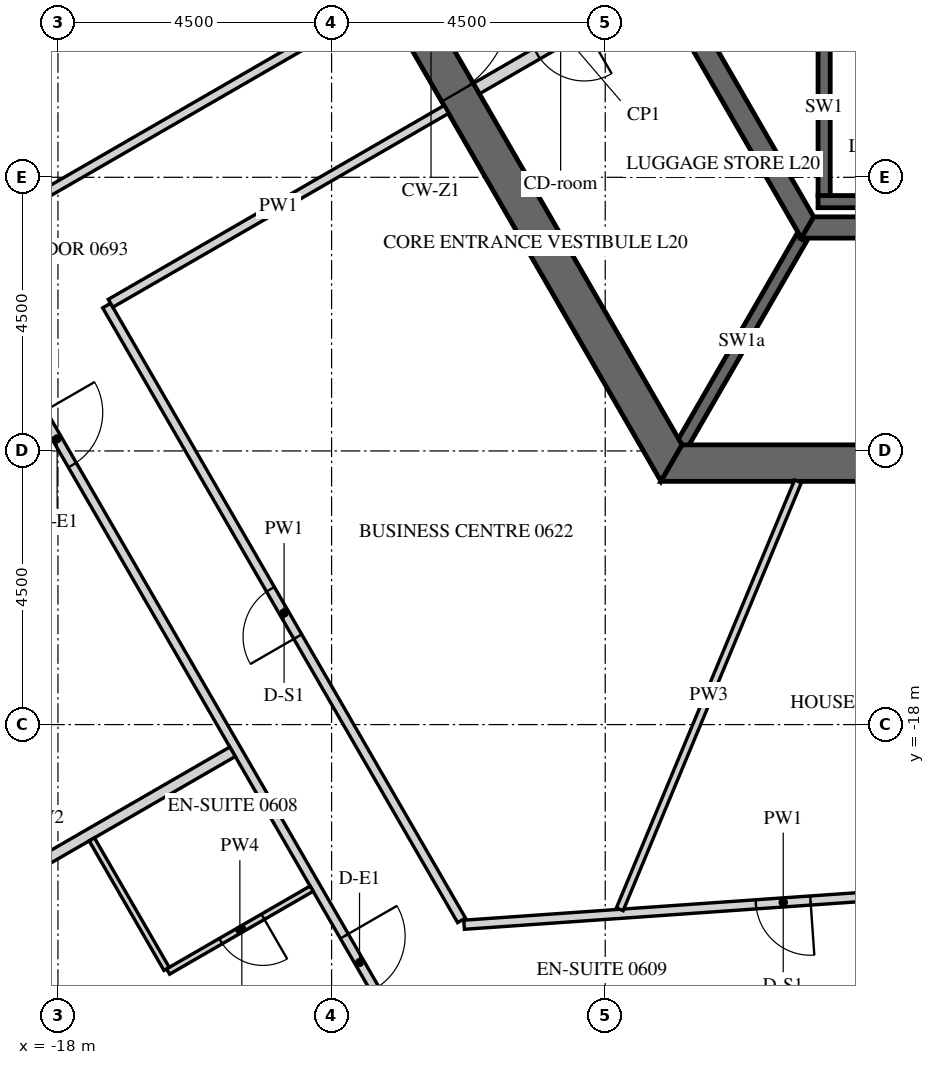
"""IFC4 building model, lengths in metres.
Left out: names, types, materials, properties, quantities, classifications, styles, units other than length and angle.
Written with IfcOpenShell. Run it as: python <this file> out.ifc"""

import sys

from ifc_helpers import new_model, si_unit, direction, frame, frame_2d, origin, place, context, subcontext, project, spatial, polyline, rectangle, outline, extrude, element, fill, save


model = new_model("IFC4")
c1 = context("Model", 3, precision=1e-05, world=origin(), true_north=direction((0.0, 1.0)))
c2 = subcontext(c1, "Body", "Model", "MODEL_VIEW")
j1 = project(units=[si_unit("LENGTHUNIT", "METRE"), si_unit("PLANEANGLEUNIT", "RADIAN")], contexts=[c1])
p1 = place(None, origin())
s1 = spatial("IfcSite", under=j1, at=p1, CompositionType="ELEMENT")
p2 = place(p1, origin())
s2 = spatial("IfcBuilding", under=s1, at=p2, CompositionType="ELEMENT")
p3 = place(p2, frame((0.0, 0.0, 92.1)))
s3 = spatial("IfcBuildingStorey", under=s2, at=p3, CompositionType="ELEMENT", Elevation=92.1)
p4 = place(p3, frame((-32.655, -2.89, -0.15), z_axis=(0.0, 0.0, 1.0), x_axis=(0.499997711317, -0.866026725152, 0.0)))
e1 = element("IfcWall", 1, at=p4, inside=s3, PredefinedType="SOLIDWALL", context=c2, shape_type="SweptSolid", body=[
    extrude(outline(polyline([(-0.022, -0.275), (30.097, -0.275), (30.045, 0.275), (0.022, 0.275), (-0.022, -0.275)])), origin(), (0.0, 0.0, 1.0), 3.9),
])
p5 = place(p4, frame((1.236, 0.0, 1.05)))
e2 = element("IfcOpeningElement", 2, at=p5, cuts=e1, PredefinedType="OPENING", context=c2, shape_type="SweptSolid", body=[
    extrude(rectangle(XDim=2.4, YDim=2.4, at=frame_2d((1.2, 1.2))), frame((0.0, 0.285, 0.0), z_axis=(0.0, -1.0, 0.0), x_axis=(1.0, 0.0, 0.0)), (0.0, 0.0, 1.0), 0.57),
])
p6 = place(p4, frame((4.835, 0.0, 1.05)))
e3 = element("IfcOpeningElement", 3, at=p6, cuts=e1, PredefinedType="OPENING", context=c2, shape_type="SweptSolid", body=[
    extrude(rectangle(XDim=2.4, YDim=2.4, at=frame_2d((1.2, 1.2))), frame((0.0, 0.285, 0.0), z_axis=(0.0, -1.0, 0.0), x_axis=(1.0, 0.0, 0.0)), (0.0, 0.0, 1.0), 0.57),
])
p7 = place(p4, frame((8.436, 0.0, 1.05)))
e4 = element("IfcOpeningElement", 4, at=p7, cuts=e1, PredefinedType="OPENING", context=c2, shape_type="SweptSolid", body=[
    extrude(rectangle(XDim=2.4, YDim=2.4, at=frame_2d((1.2, 1.2))), frame((0.0, 0.285, 0.0), z_axis=(0.0, -1.0, 0.0), x_axis=(1.0, 0.0, 0.0)), (0.0, 0.0, 1.0), 0.57),
])
p8 = place(p4, frame((12.035, 0.0, 1.05)))
e5 = element("IfcOpeningElement", 5, at=p8, cuts=e1, PredefinedType="OPENING", context=c2, shape_type="SweptSolid", body=[
    extrude(rectangle(XDim=2.4, YDim=2.4, at=frame_2d((1.2, 1.2))), frame((0.0, 0.285, 0.0), z_axis=(0.0, -1.0, 0.0), x_axis=(1.0, 0.0, 0.0)), (0.0, 0.0, 1.0), 0.57),
])
p9 = place(p4, frame((15.635, 0.0, 1.05)))
e6 = element("IfcOpeningElement", 6, at=p9, cuts=e1, PredefinedType="OPENING", context=c2, shape_type="SweptSolid", body=[
    extrude(rectangle(XDim=2.4, YDim=2.4, at=frame_2d((1.2, 1.2))), frame((0.0, 0.285, 0.0), z_axis=(0.0, -1.0, 0.0), x_axis=(1.0, 0.0, 0.0)), (0.0, 0.0, 1.0), 0.57),
])
p10 = place(p4, frame((19.236, 0.0, 1.05)))
e7 = element("IfcOpeningElement", 7, at=p10, cuts=e1, PredefinedType="OPENING", context=c2, shape_type="SweptSolid", body=[
    extrude(rectangle(XDim=2.4, YDim=2.4, at=frame_2d((1.2, 1.2))), frame((0.0, 0.285, 0.0), z_axis=(0.0, -1.0, 0.0), x_axis=(1.0, 0.0, 0.0)), (0.0, 0.0, 1.0), 0.57),
])
p11 = place(p4, frame((22.835, 0.0, 1.05)))
e8 = element("IfcOpeningElement", 8, at=p11, cuts=e1, PredefinedType="OPENING", context=c2, shape_type="SweptSolid", body=[
    extrude(rectangle(XDim=2.4, YDim=2.4, at=frame_2d((1.2, 1.2))), frame((0.0, 0.285, 0.0), z_axis=(0.0, -1.0, 0.0), x_axis=(1.0, 0.0, 0.0)), (0.0, 0.0, 1.0), 0.57),
])
p12 = place(p4, frame((26.436, 0.0, 1.05)))
e9 = element("IfcOpeningElement", 9, at=p12, cuts=e1, PredefinedType="OPENING", context=c2, shape_type="SweptSolid", body=[
    extrude(rectangle(XDim=2.4, YDim=2.4, at=frame_2d((1.2, 1.2))), frame((0.0, 0.285, 0.0), z_axis=(0.0, -1.0, 0.0), x_axis=(1.0, 0.0, 0.0)), (0.0, 0.0, 1.0), 0.57),
])
p13 = place(p3, frame((-15.819, 0.0, -0.15), z_axis=(0.0, 0.0, 1.0), x_axis=(0.499999880136, -0.866025472988, 0.0)))
e10 = element("IfcWall", 10, at=p13, inside=s3, PredefinedType="SHEAR", context=c2, shape_type="SweptSolid", body=[
    extrude(outline(polyline([(-0.173, -0.3), (15.993, -0.3), (15.646, 0.3), (0.173, 0.3), (-0.173, -0.3)])), origin(), (0.0, 0.0, 1.0), 3.9),
])
p14 = place(p13, frame((6.981, 0.0, 0.15)))
e11 = element("IfcOpeningElement", 11, at=p14, cuts=e10, PredefinedType="OPENING", context=c2, shape_type="SweptSolid", body=[
    extrude(rectangle(XDim=1.8, YDim=2.4, at=frame_2d((0.9, 1.2))), frame((0.0, 0.31, 0.0), z_axis=(0.0, -1.0, 0.0), x_axis=(1.0, 0.0, 0.0)), (0.0, 0.0, 1.0), 0.62),
])
p15 = place(p3, frame((-7.91, -13.7, -0.15), z_axis=(0.0, 0.0, 1.0), x_axis=(1.0, 0.0, 0.0)))
e12 = element("IfcWall", 12, at=p15, inside=s3, PredefinedType="SHEAR", context=c2, shape_type="SweptSolid", body=[
    extrude(outline(polyline([(-0.173, -0.3), (15.993, -0.3), (15.646, 0.3), (0.173, 0.3), (-0.173, -0.3)])), origin(), (0.0, 0.0, 1.0), 3.9),
])
p16 = place(p15, frame((7.31, 0.0, 0.15)))
e13 = element("IfcOpeningElement", 13, at=p16, cuts=e12, PredefinedType="OPENING", context=c2, shape_type="SweptSolid", body=[
    extrude(rectangle(XDim=1.2, YDim=2.4, at=frame_2d((0.6, 1.2))), frame((0.0, 0.31, 0.0), z_axis=(0.0, -1.0, 0.0), x_axis=(1.0, 0.0, 0.0)), (0.0, 0.0, 1.0), 0.62),
])
p17 = place(p3, frame((-11.345, 0.0, -0.15), z_axis=(0.0, 0.0, 1.0), x_axis=(0.499995046907, -0.866028263435, 0.0)))
e14 = element("IfcWall", 14, at=p17, inside=s3, PredefinedType="SHEAR", context=c2, shape_type="SweptSolid", body=[
    extrude(outline(polyline([(-0.101, -0.175), (11.446, -0.175), (11.244, 0.175), (0.101, 0.175), (-0.101, -0.175)])), origin(), (0.0, 0.0, 1.0), 3.9),
])
p18 = place(p17, frame((4.744, 0.0, 0.15)))
e15 = element("IfcOpeningElement", 15, at=p18, cuts=e14, PredefinedType="OPENING", context=c2, shape_type="SweptSolid", body=[
    extrude(rectangle(XDim=1.8, YDim=2.4, at=frame_2d((0.9, 1.2))), frame((0.0, 0.185, 0.0), z_axis=(0.0, -1.0, 0.0), x_axis=(1.0, 0.0, 0.0)), (0.0, 0.0, 1.0), 0.37),
])
p19 = place(p3, frame((-5.673, -9.825, -0.15), z_axis=(0.0, 0.0, 1.0), x_axis=(1.0, 0.0, 0.0)))
e16 = element("IfcWall", 16, at=p19, inside=s3, PredefinedType="SHEAR", context=c2, shape_type="SweptSolid", body=[
    extrude(outline(polyline([(-0.101, -0.175), (11.446, -0.175), (11.244, 0.175), (0.101, 0.175), (-0.101, -0.175)])), origin(), (0.0, 0.0, 1.0), 3.9),
])
p20 = place(p3, frame((-5.5, -9.4, -0.25), z_axis=(0.0, 0.0, 1.0), x_axis=(1.0, 0.0, 0.0)))
e17 = element("IfcWall", 17, at=p20, inside=s3, PredefinedType="SHEAR", context=c2, shape_type="SweptSolid", body=[
    extrude(rectangle(XDim=9.2, YDim=0.2, at=frame_2d((4.6, 0.0))), origin(), (0.0, 0.0, 1.0), 3.9),
])
p21 = place(p3, frame((-5.4, -9.3, -0.25), z_axis=(0.0, 0.0, 1.0), x_axis=(0.0, 1.0, 0.0)))
e18 = element("IfcWall", 18, at=p21, inside=s3, PredefinedType="SHEAR", context=c2, shape_type="SweptSolid", body=[
    extrude(rectangle(XDim=2.9, YDim=0.2, at=frame_2d((1.45, 0.0))), origin(), (0.0, 0.0, 1.0), 3.9),
])
p22 = place(p3, frame((-5.773, -10.0, -0.15), z_axis=(0.0, 0.0, 1.0), x_axis=(-0.500038251005, -0.86600331843, 0.0)))
e19 = element("IfcWall", 19, at=p22, inside=s3, PredefinedType="SHEAR", context=c2, shape_type="SweptSolid", body=[
    extrude(rectangle(XDim=3.926, YDim=0.2, at=frame_2d((1.963, 0.0))), origin(), (0.0, 0.0, 1.0), 3.9),
])
p23 = place(p3, frame((-8.175, -5.841, 0.0), z_axis=(0.0, 0.0, 1.0), x_axis=(-0.866020560687, -0.500008388397, 0.0)))
e20 = element("IfcWall", 20, at=p23, inside=s3, PredefinedType="PARTITIONING", context=c2, shape_type="SweptSolid", body=[
    extrude(rectangle(XDim=3.4, YDim=0.2, at=frame_2d((1.7, 0.0))), origin(), (0.0, 0.0, 1.0), 3.65),
])
p24 = place(p23, frame((1.35, 0.0, 0.0)))
e21 = element("IfcOpeningElement", 21, at=p24, cuts=e20, PredefinedType="OPENING", context=c2, shape_type="SweptSolid", body=[
    extrude(rectangle(XDim=0.9, YDim=2.1, at=frame_2d((0.45, 1.05))), frame((0.0, 0.11, 0.0), z_axis=(0.0, -1.0, 0.0), x_axis=(1.0, 0.0, 0.0)), (0.0, 0.0, 1.0), 0.22),
])
p25 = place(p3, frame((-24.436, -2.175, 0.0), z_axis=(0.0, 0.0, 1.0), x_axis=(0.499996816197, -0.866027241946, 0.0)))
e22 = element("IfcWall", 22, at=p25, inside=s3, PredefinedType="PARTITIONING", context=c2, shape_type="SweptSolid", body=[
    extrude(rectangle(XDim=24.238, YDim=0.15, at=frame_2d((12.119, 0.0))), origin(), (0.0, 0.0, 1.0), 2.988),
])
p26 = place(p25, frame((0.429, 0.0, 0.0)))
e23 = element("IfcOpeningElement", 23, at=p26, cuts=e22, PredefinedType="OPENING", context=c2, shape_type="SweptSolid", body=[
    extrude(rectangle(XDim=1.0, YDim=2.1, at=frame_2d((0.5, 1.05))), frame((0.0, 0.085, 0.0), z_axis=(0.0, -1.0, 0.0), x_axis=(1.0, 0.0, 0.0)), (0.0, 0.0, 1.0), 0.17),
])
p27 = place(p25, frame((12.346, 0.0, 0.0)))
e24 = element("IfcOpeningElement", 24, at=p27, cuts=e22, PredefinedType="OPENING", context=c2, shape_type="SweptSolid", body=[
    extrude(rectangle(XDim=1.0, YDim=2.1, at=frame_2d((0.5, 1.05))), frame((0.0, 0.085, 0.0), z_axis=(0.0, -1.0, 0.0), x_axis=(1.0, 0.0, 0.0)), (0.0, 0.0, 1.0), 0.17),
])
p28 = place(p25, frame((22.292, 0.0, 0.0)))
e25 = element("IfcOpeningElement", 25, at=p28, cuts=e22, PredefinedType="OPENING", context=c2, shape_type="SweptSolid", body=[
    extrude(rectangle(XDim=1.0, YDim=2.1, at=frame_2d((0.5, 1.05))), frame((0.0, 0.085, 0.0), z_axis=(0.0, -1.0, 0.0), x_axis=(1.0, 0.0, 0.0)), (0.0, 0.0, 1.0), 0.17),
])
p29 = place(p3, frame((-12.234, -23.16, 0.0), z_axis=(0.0, 0.0, 1.0), x_axis=(0.997563845372, 0.069759403714, 0.0)))
e26 = element("IfcWall", 26, at=p29, inside=s3, PredefinedType="PARTITIONING", context=c2, shape_type="SweptSolid", body=[
    extrude(rectangle(XDim=22.335, YDim=0.15, at=frame_2d((11.168, 0.0))), origin(), (0.0, 0.0, 1.0), 2.988),
])
p30 = place(p29, frame((9.809, 0.0, 0.0)))
e27 = element("IfcOpeningElement", 27, at=p30, cuts=e26, PredefinedType="OPENING", context=c2, shape_type="SweptSolid", body=[
    extrude(rectangle(XDim=1.0, YDim=2.1, at=frame_2d((0.5, 1.05))), frame((0.0, 0.085, 0.0), z_axis=(0.0, -1.0, 0.0), x_axis=(1.0, 0.0, 0.0)), (0.0, 0.0, 1.0), 0.17),
])
p31 = place(p29, frame((19.972, 0.0, 0.0)))
e28 = element("IfcOpeningElement", 28, at=p31, cuts=e26, PredefinedType="OPENING", context=c2, shape_type="SweptSolid", body=[
    extrude(rectangle(XDim=1.0, YDim=2.1, at=frame_2d((0.5, 1.05))), frame((0.0, 0.085, 0.0), z_axis=(0.0, -1.0, 0.0), x_axis=(1.0, 0.0, 0.0)), (0.0, 0.0, 1.0), 0.17),
])
p32 = place(p3, frame((-12.664, -6.066, 0.0), z_axis=(0.0, 0.0, 1.0), x_axis=(-0.866021702275, -0.500006411147, 0.0)))
e29 = element("IfcWall", 29, at=p32, inside=s3, PredefinedType="PARTITIONING", context=c2, shape_type="SweptSolid", body=[
    extrude(rectangle(XDim=6.45, YDim=0.15, at=frame_2d((3.225, 0.0))), origin(), (0.0, 0.0, 1.0), 2.988),
])
p33 = place(p3, frame((-0.825, -20.558, 0.0), z_axis=(0.0, 0.0, 1.0), x_axis=(-0.997564524135, -0.069749696677, 0.0)))
e30 = element("IfcWall", 30, at=p33, inside=s3, PredefinedType="PARTITIONING", context=c2, shape_type="SweptSolid", body=[
    extrude(rectangle(XDim=10.522, YDim=0.15, at=frame_2d((5.261, 0.0))), origin(), (0.0, 0.0, 1.0), 2.988),
])
p34 = place(p33, frame((4.811, 0.0, 0.0)))
e31 = element("IfcOpeningElement", 31, at=p34, cuts=e30, PredefinedType="OPENING", context=c2, shape_type="SweptSolid", body=[
    extrude(rectangle(XDim=0.9, YDim=2.1, at=frame_2d((0.45, 1.05))), frame((0.0, 0.085, 0.0), z_axis=(0.0, -1.0, 0.0), x_axis=(1.0, 0.0, 0.0)), (0.0, 0.0, 1.0), 0.17),
])
p35 = place(p3, frame((-11.363, -21.219, 0.0), z_axis=(0.0, 0.0, 1.0), x_axis=(-0.50001451402, 0.866017023949, 0.0)))
e32 = element("IfcWall", 32, at=p35, inside=s3, PredefinedType="PARTITIONING", context=c2, shape_type="SweptSolid", body=[
    extrude(rectangle(XDim=11.674, YDim=0.15, at=frame_2d((5.837, 0.0))), origin(), (0.0, 0.0, 1.0), 2.988),
])
p36 = place(p35, frame((5.387, 0.0, 0.0)))
e33 = element("IfcOpeningElement", 33, at=p36, cuts=e32, PredefinedType="OPENING", context=c2, shape_type="SweptSolid", body=[
    extrude(rectangle(XDim=0.9, YDim=2.1, at=frame_2d((0.45, 1.05))), frame((0.0, 0.085, 0.0), z_axis=(0.0, -1.0, 0.0), x_axis=(1.0, 0.0, 0.0)), (0.0, 0.0, 1.0), 0.17),
])
p37 = place(p3, frame((-17.135, -11.072, 0.0), z_axis=(0.0, 0.0, 1.0), x_axis=(0.866028703517, 0.499994284652, 0.0)))
e34 = element("IfcWall", 34, at=p37, inside=s3, PredefinedType="PARTITIONING", context=c2, shape_type="SweptSolid", body=[
    extrude(rectangle(XDim=6.375, YDim=0.15, at=frame_2d((3.188, 0.0))), origin(), (0.0, 0.0, 1.0), 2.988),
])
p38 = place(p3, frame((-21.299, -22.009, 0.0), z_axis=(0.0, 0.0, 1.0), x_axis=(0.866024672353, 0.500001266874, 0.0)))
e35 = element("IfcWall", 35, at=p38, inside=s3, PredefinedType="PARTITIONING", context=c2, shape_type="SweptSolid", body=[
    extrude(rectangle(XDim=7.125, YDim=0.18, at=frame_2d((3.562, 0.0))), origin(), (0.0, 0.0, 1.0), 2.988),
])
p39 = place(p3, frame((-13.829, -20.698, 0.0), z_axis=(0.0, 0.0, 1.0), x_axis=(-0.866012511928, -0.500022328685, 0.0)))
e36 = element("IfcWall", 36, at=p39, inside=s3, PredefinedType="PARTITIONING", context=c2, shape_type="SweptSolid", body=[
    extrude(rectangle(XDim=2.725, YDim=0.1, at=frame_2d((1.363, 0.0))), origin(), (0.0, 0.0, 1.0), 2.988),
])
p40 = place(p39, frame((0.925, 0.0, 0.0)))
e37 = element("IfcOpeningElement", 37, at=p40, cuts=e36, PredefinedType="OPENING", context=c2, shape_type="SweptSolid", body=[
    extrude(rectangle(XDim=0.8, YDim=2.1, at=frame_2d((0.4, 1.05))), frame((0.0, 0.06, 0.0), z_axis=(0.0, -1.0, 0.0), x_axis=(1.0, 0.0, 0.0)), (0.0, 0.0, 1.0), 0.12),
])
p41 = place(p3, frame((-16.213, -22.018, 0.0), z_axis=(0.0, 0.0, 1.0), x_axis=(-0.500003092839, 0.866023618125, 0.0)))
e38 = element("IfcWall", 38, at=p41, inside=s3, PredefinedType="PARTITIONING", context=c2, shape_type="SweptSolid", body=[
    extrude(rectangle(XDim=2.46, YDim=0.1, at=frame_2d((1.23, 0.0))), origin(), (0.0, 0.0, 1.0), 2.988),
])
p42 = place(p3, frame((-5.83, -14.0, 0.0), z_axis=(0.0, 0.0, 1.0), x_axis=(-0.384440276883, -0.923149865141, 0.0)))
e39 = element("IfcWall", 39, at=p42, inside=s3, PredefinedType="PARTITIONING", context=c2, shape_type="SweptSolid", body=[
    extrude(rectangle(XDim=7.623, YDim=0.12, at=frame_2d((3.812, 0.0))), origin(), (0.0, 0.0, 1.0), 2.988),
])
p43 = place(p14, origin())
e40 = element("IfcDoor", 40, at=p43, inside=s3, OperationType="DOUBLE_DOOR_SINGLE_SWING", PredefinedType="DOOR", context=c2, shape_type="SweptSolid", body=[
    extrude(rectangle(XDim=1.8, YDim=2.4, at=frame_2d((0.9, 1.2))), frame((0.0, 0.025, 0.0), z_axis=(0.0, -1.0, 0.0), x_axis=(1.0, 0.0, 0.0)), (0.0, 0.0, 1.0), 0.05),
])
fill(e11, e40)
p44 = place(p24, origin())
e41 = element("IfcDoor", 41, at=p44, inside=s3, OperationType="SINGLE_SWING_LEFT", PredefinedType="DOOR", context=c2, shape_type="SweptSolid", body=[
    extrude(rectangle(XDim=0.9, YDim=2.1, at=frame_2d((0.45, 1.05))), frame((0.0, 0.025, 0.0), z_axis=(0.0, -1.0, 0.0), x_axis=(1.0, 0.0, 0.0)), (0.0, 0.0, 1.0), 0.05),
])
fill(e21, e41)
p45 = place(p27, origin())
e42 = element("IfcDoor", 42, at=p45, inside=s3, OperationType="SINGLE_SWING_RIGHT", PredefinedType="DOOR", context=c2, shape_type="SweptSolid", body=[
    extrude(rectangle(XDim=1.0, YDim=2.1, at=frame_2d((0.5, 1.05))), frame((0.0, 0.025, 0.0), z_axis=(0.0, -1.0, 0.0), x_axis=(1.0, 0.0, 0.0)), (0.0, 0.0, 1.0), 0.05),
])
fill(e24, e42)
p46 = place(p28, origin())
e43 = element("IfcDoor", 43, at=p46, inside=s3, OperationType="SINGLE_SWING_LEFT", PredefinedType="DOOR", context=c2, shape_type="SweptSolid", body=[
    extrude(rectangle(XDim=1.0, YDim=2.1, at=frame_2d((0.5, 1.05))), frame((0.0, 0.025, 0.0), z_axis=(0.0, -1.0, 0.0), x_axis=(1.0, 0.0, 0.0)), (0.0, 0.0, 1.0), 0.05),
])
fill(e25, e43)
p47 = place(p40, origin())
e44 = element("IfcDoor", 44, at=p47, inside=s3, OperationType="SINGLE_SWING_RIGHT", PredefinedType="DOOR", context=c2, shape_type="SweptSolid", body=[
    extrude(rectangle(XDim=0.8, YDim=2.1, at=frame_2d((0.4, 1.05))), frame((0.0, 0.025, 0.0), z_axis=(0.0, -1.0, 0.0), x_axis=(1.0, 0.0, 0.0)), (0.0, 0.0, 1.0), 0.05),
])
fill(e37, e44)
p48 = place(p34, origin())
e45 = element("IfcDoor", 45, at=p48, inside=s3, OperationType="SINGLE_SWING_LEFT", PredefinedType="DOOR", context=c2, shape_type="SweptSolid", body=[
    extrude(rectangle(XDim=0.9, YDim=2.1, at=frame_2d((0.45, 1.05))), frame((0.0, 0.025, 0.0), z_axis=(0.0, -1.0, 0.0), x_axis=(1.0, 0.0, 0.0)), (0.0, 0.0, 1.0), 0.05),
])
fill(e31, e45)
p49 = place(p36, origin())
e46 = element("IfcDoor", 46, at=p49, inside=s3, OperationType="SINGLE_SWING_RIGHT", PredefinedType="DOOR", context=c2, shape_type="SweptSolid", body=[
    extrude(rectangle(XDim=0.9, YDim=2.1, at=frame_2d((0.45, 1.05))), frame((0.0, 0.025, 0.0), z_axis=(0.0, -1.0, 0.0), x_axis=(1.0, 0.0, 0.0)), (0.0, 0.0, 1.0), 0.05),
])
fill(e33, e46)
save(model, sys.argv[1])
